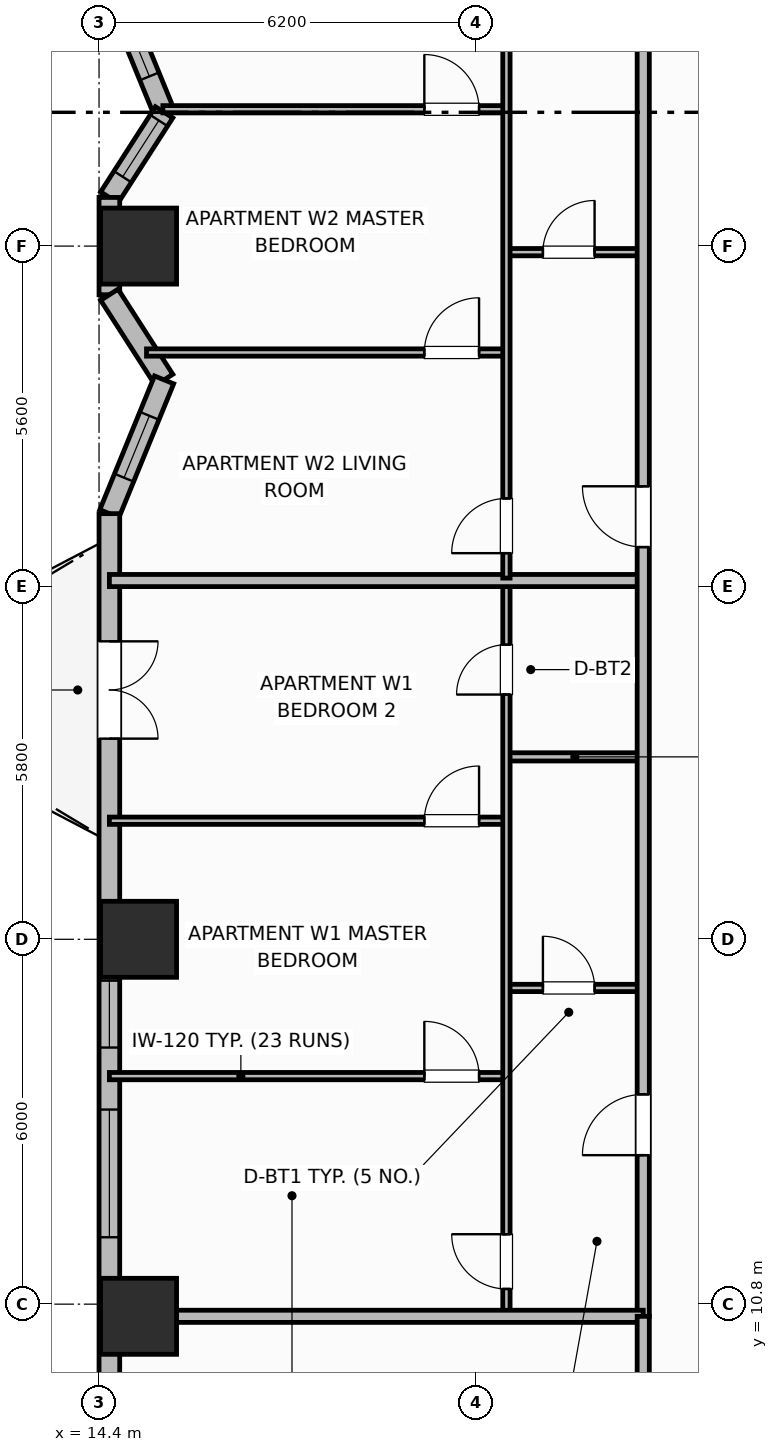
"""IFC4 building model, lengths in metres.
Left out: names, types, materials, properties, quantities, classifications, styles, units other than length and angle.
Written with IfcOpenShell. Run it as: python <this file> out.ifc"""

import sys

from ifc_helpers import new_model, si_unit, direction, frame, frame_2d, origin, origin_2d, place, context, subcontext, project, spatial, rectangle, extrude, element, fill, save


model = new_model("IFC4")
c1 = context("Model", 3, precision=1e-05, world=origin(), true_north=direction((0.0, 1.0)))
c2 = subcontext(c1, "Body", "Model", "MODEL_VIEW")
j1 = project(units=[si_unit("LENGTHUNIT", "METRE"), si_unit("PLANEANGLEUNIT", "RADIAN")], contexts=[c1])
p1 = place(None, origin())
s1 = spatial("IfcSite", under=j1, at=p1, CompositionType="ELEMENT")
p2 = place(p1, origin())
s2 = spatial("IfcBuilding", under=s1, at=p2, CompositionType="ELEMENT")
p3 = place(p2, frame((0.0, 0.0, 39.9)))
s3 = spatial("IfcBuildingStorey", under=s2, at=p3, CompositionType="ELEMENT", Elevation=39.9)
for number, where, z_axis, x_axis in (
    (1, (15.05, 10.6, 0.0), (0.0, 0.0, 1.0), (1.0, 0.0, 0.0)),
    (2, (15.05, 16.8, 0.0), (0.0, 0.0, 1.0), (1.0, 0.0, 0.0)),
    (3, (15.05, 28.2, 0.0), (0.0, 0.0, 1.0), (1.0, 0.0, 0.0)),
):
    element("IfcColumn", number, at=place(p3, frame(where, z_axis=z_axis, x_axis=x_axis)), inside=s3, PredefinedType="COLUMN", context=c2, shape_type="SweptSolid", body=[
        extrude(rectangle(XDim=1.25, YDim=1.25, at=origin_2d()), origin(), (0.0, 0.0, 1.0), 3.7),
    ])
p4 = place(p3, frame((14.57, 32.6, 0.0), z_axis=(0.0, 0.0, 1.0), x_axis=(0.378568858991, -0.925573130013, 0.0)))
e4 = element("IfcWall", 4, at=p4, inside=s3, PredefinedType="SOLIDWALL", context=c2, shape_type="SweptSolid", body=[
    extrude(rectangle(XDim=2.377, YDim=0.34, at=frame_2d((1.188, 0.0))), origin(), (0.0, 0.0, 1.0), 2.7),
])
p5 = place(p4, frame((0.638, 0.0, 0.89)))
e5 = element("IfcOpeningElement", 5, at=p5, cuts=e4, PredefinedType="OPENING", context=c2, shape_type="SweptSolid", body=[
    extrude(rectangle(XDim=1.1, YDim=1.65, at=frame_2d((0.55, 0.825))), frame((0.0, 0.18, 0.0), z_axis=(0.0, -1.0, 0.0), x_axis=(1.0, 0.0, 0.0)), (0.0, 0.0, 1.0), 0.36),
])
p6 = place(p3, frame((15.47, 30.4, 0.0), z_axis=(0.0, 0.0, 1.0), x_axis=(-0.540742762169, -0.841188008214, 0.0)))
e6 = element("IfcWall", 6, at=p6, inside=s3, PredefinedType="SOLIDWALL", context=c2, shape_type="SweptSolid", body=[
    extrude(rectangle(XDim=1.664, YDim=0.34, at=frame_2d((0.832, 0.0))), origin(), (0.0, 0.0, 1.0), 2.7),
])
p7 = place(p6, frame((0.16, 0.0, 0.89)))
e7 = element("IfcOpeningElement", 7, at=p7, cuts=e6, PredefinedType="OPENING", context=c2, shape_type="SweptSolid", body=[
    extrude(rectangle(XDim=1.1, YDim=1.65, at=frame_2d((0.55, 0.825))), frame((0.0, 0.18, 0.0), z_axis=(0.0, -1.0, 0.0), x_axis=(1.0, 0.0, 0.0)), (0.0, 0.0, 1.0), 0.36),
])
p8 = place(p3, frame((14.57, 29.0, 0.0), z_axis=(0.0, 0.0, 1.0), x_axis=(0.0, -1.0, 0.0)))
e8 = element("IfcWall", 8, at=p8, inside=s3, PredefinedType="SOLIDWALL", context=c2, shape_type="SweptSolid", body=[
    extrude(rectangle(XDim=1.6, YDim=0.34, at=frame_2d((0.8, 0.0))), origin(), (0.0, 0.0, 1.0), 2.7),
])
p9 = place(p3, frame((14.57, 27.4, 0.0), z_axis=(0.0, 0.0, 1.0), x_axis=(0.540742762169, -0.841188008214, 0.0)))
e9 = element("IfcWall", 9, at=p9, inside=s3, PredefinedType="SOLIDWALL", context=c2, shape_type="SweptSolid", body=[
    extrude(rectangle(XDim=1.664, YDim=0.34, at=frame_2d((0.832, 0.0))), origin(), (0.0, 0.0, 1.0), 2.7),
])
p10 = place(p3, frame((15.47, 26.0, 0.0), z_axis=(0.0, 0.0, 1.0), x_axis=(-0.378604849088, -0.925558408879, 0.0)))
e10 = element("IfcWall", 10, at=p10, inside=s3, PredefinedType="SOLIDWALL", context=c2, shape_type="SweptSolid", body=[
    extrude(rectangle(XDim=2.377, YDim=0.34, at=frame_2d((1.188, 0.0))), origin(), (0.0, 0.0, 1.0), 2.7),
])
p11 = place(p10, frame((0.638, 0.0, 0.89)))
e11 = element("IfcOpeningElement", 11, at=p11, cuts=e10, PredefinedType="OPENING", context=c2, shape_type="SweptSolid", body=[
    extrude(rectangle(XDim=1.1, YDim=1.65, at=frame_2d((0.55, 0.825))), frame((0.0, 0.18, 0.0), z_axis=(0.0, -1.0, 0.0), x_axis=(1.0, 0.0, 0.0)), (0.0, 0.0, 1.0), 0.36),
])
p12 = place(p3, frame((14.57, 23.8, 0.0), z_axis=(0.0, 0.0, 1.0), x_axis=(0.0, -1.0, 0.0)))
e12 = element("IfcWall", 12, at=p12, inside=s3, PredefinedType="SOLIDWALL", context=c2, shape_type="SweptSolid", body=[
    extrude(rectangle(XDim=14.8, YDim=0.34, at=frame_2d((7.4, 0.0))), origin(), (0.0, 0.0, 1.0), 2.7),
])
p13 = place(p12, frame((2.1, 0.0, 0.0)))
e13 = element("IfcOpeningElement", 13, at=p13, cuts=e12, PredefinedType="OPENING", context=c2, shape_type="SweptSolid", body=[
    extrude(rectangle(XDim=1.6, YDim=2.1, at=frame_2d((0.8, 1.05))), frame((0.0, 0.18, 0.0), z_axis=(0.0, -1.0, 0.0), x_axis=(1.0, 0.0, 0.0)), (0.0, 0.0, 1.0), 0.36),
])
p14 = place(p12, frame((7.68, 0.0, 0.89)))
e14 = element("IfcOpeningElement", 14, at=p14, cuts=e12, PredefinedType="OPENING", context=c2, shape_type="SweptSolid", body=[
    extrude(rectangle(XDim=1.1, YDim=1.65, at=frame_2d((0.55, 0.825))), frame((0.0, 0.18, 0.0), z_axis=(0.0, -1.0, 0.0), x_axis=(1.0, 0.0, 0.0)), (0.0, 0.0, 1.0), 0.36),
])
p15 = place(p12, frame((9.8, 0.0, 0.68)))
e15 = element("IfcOpeningElement", 15, at=p15, cuts=e12, PredefinedType="OPENING", context=c2, shape_type="SweptSolid", body=[
    extrude(rectangle(XDim=2.1, YDim=1.9, at=frame_2d((1.05, 0.95))), frame((0.0, 0.18, 0.0), z_axis=(0.0, -1.0, 0.0), x_axis=(1.0, 0.0, 0.0)), (0.0, 0.0, 1.0), 0.36),
])
p16 = place(p3, frame((21.1, 16.0, 0.0), z_axis=(0.0, 0.0, 1.0), x_axis=(1.0, 0.0, 0.0)))
e16 = element("IfcWall", 16, at=p16, inside=s3, PredefinedType="PARTITIONING", context=c2, shape_type="SweptSolid", body=[
    extrude(rectangle(XDim=2.25, YDim=0.12, at=frame_2d((1.125, 0.0))), origin(), (0.0, 0.0, 1.0), 2.53),
])
p17 = place(p16, frame((0.6, 0.0, 0.0)))
e17 = element("IfcOpeningElement", 17, at=p17, cuts=e16, PredefinedType="OPENING", context=c2, shape_type="SweptSolid", body=[
    extrude(rectangle(XDim=0.85, YDim=2.1, at=frame_2d((0.425, 1.05))), frame((0.0, 0.07, 0.0), z_axis=(0.0, -1.0, 0.0), x_axis=(1.0, 0.0, 0.0)), (0.0, 0.0, 1.0), 0.14),
])
p18 = place(p3, frame((21.1, 19.8, 0.0), z_axis=(0.0, 0.0, 1.0), x_axis=(1.0, 0.0, 0.0)))
e18 = element("IfcWall", 18, at=p18, inside=s3, PredefinedType="PARTITIONING", context=c2, shape_type="SweptSolid", body=[
    extrude(rectangle(XDim=2.25, YDim=0.135, at=frame_2d((1.125, 0.0))), origin(), (0.0, 0.0, 1.0), 2.53),
])
p19 = place(p3, frame((14.57, 14.55, 0.0), z_axis=(0.0, 0.0, 1.0), x_axis=(1.0, 0.0, 0.0)))
e19 = element("IfcWall", 19, at=p19, inside=s3, PredefinedType="PARTITIONING", context=c2, shape_type="SweptSolid", body=[
    extrude(rectangle(XDim=6.53, YDim=0.12, at=frame_2d((3.265, 0.0))), origin(), (0.0, 0.0, 1.0), 2.53),
])
p20 = place(p19, frame((5.18, 0.0, 0.0)))
e20 = element("IfcOpeningElement", 20, at=p20, cuts=e19, PredefinedType="OPENING", context=c2, shape_type="SweptSolid", body=[
    extrude(rectangle(XDim=0.9, YDim=2.1, at=frame_2d((0.45, 1.05))), frame((0.0, 0.07, 0.0), z_axis=(0.0, -1.0, 0.0), x_axis=(1.0, 0.0, 0.0)), (0.0, 0.0, 1.0), 0.14),
])
p21 = place(p3, frame((14.57, 18.75, 0.0), z_axis=(0.0, 0.0, 1.0), x_axis=(1.0, 0.0, 0.0)))
e21 = element("IfcWall", 21, at=p21, inside=s3, PredefinedType="PARTITIONING", context=c2, shape_type="SweptSolid", body=[
    extrude(rectangle(XDim=6.53, YDim=0.12, at=frame_2d((3.265, 0.0))), origin(), (0.0, 0.0, 1.0), 2.53),
])
p22 = place(p21, frame((5.18, 0.0, 0.0)))
e22 = element("IfcOpeningElement", 22, at=p22, cuts=e21, PredefinedType="OPENING", context=c2, shape_type="SweptSolid", body=[
    extrude(rectangle(XDim=0.9, YDim=2.1, at=frame_2d((0.45, 1.05))), frame((0.0, 0.07, 0.0), z_axis=(0.0, -1.0, 0.0), x_axis=(1.0, 0.0, 0.0)), (0.0, 0.0, 1.0), 0.14),
])
p23 = place(p3, frame((21.1, 10.64, 0.0), z_axis=(0.0, 0.0, 1.0), x_axis=(0.0, 1.0, 0.0)))
e23 = element("IfcWall", 23, at=p23, inside=s3, PredefinedType="PARTITIONING", context=c2, shape_type="SweptSolid", body=[
    extrude(rectangle(XDim=12.02, YDim=0.12, at=frame_2d((6.01, 0.0))), origin(), (0.0, 0.0, 1.0), 2.53),
])
p24 = place(p23, frame((0.41, 0.0, 0.0)))
e24 = element("IfcOpeningElement", 24, at=p24, cuts=e23, PredefinedType="OPENING", context=c2, shape_type="SweptSolid", body=[
    extrude(rectangle(XDim=0.9, YDim=2.1, at=frame_2d((0.45, 1.05))), frame((0.0, 0.07, 0.0), z_axis=(0.0, -1.0, 0.0), x_axis=(1.0, 0.0, 0.0)), (0.0, 0.0, 1.0), 0.14),
])
p25 = place(p23, frame((10.185, 0.0, 0.0)))
e25 = element("IfcOpeningElement", 25, at=p25, cuts=e23, PredefinedType="OPENING", context=c2, shape_type="SweptSolid", body=[
    extrude(rectangle(XDim=0.82, YDim=2.08, at=frame_2d((0.41, 1.04))), frame((0.0, 0.07, 0.0), z_axis=(0.0, -1.0, 0.0), x_axis=(1.0, 0.0, 0.0)), (0.0, 0.0, 1.0), 0.14),
])
p26 = place(p3, frame((14.57, 22.7, 0.0), z_axis=(0.0, 0.0, 1.0), x_axis=(1.0, 0.0, 0.0)))
e26 = element("IfcWall", 26, at=p26, inside=s3, PredefinedType="PARTITIONING", context=c2, shape_type="SweptSolid", body=[
    extrude(rectangle(XDim=8.78, YDim=0.2, at=frame_2d((4.39, 0.0))), origin(), (0.0, 0.0, 1.0), 2.53),
])
p27 = place(p3, frame((21.1, 28.1, 0.0), z_axis=(0.0, 0.0, 1.0), x_axis=(1.0, 0.0, 0.0)))
e27 = element("IfcWall", 27, at=p27, inside=s3, PredefinedType="PARTITIONING", context=c2, shape_type="SweptSolid", body=[
    extrude(rectangle(XDim=2.25, YDim=0.12, at=frame_2d((1.125, 0.0))), origin(), (0.0, 0.0, 1.0), 2.53),
])
p28 = place(p27, frame((0.6, 0.0, 0.0)))
e28 = element("IfcOpeningElement", 28, at=p28, cuts=e27, PredefinedType="OPENING", context=c2, shape_type="SweptSolid", body=[
    extrude(rectangle(XDim=0.85, YDim=2.1, at=frame_2d((0.425, 1.05))), frame((0.0, 0.07, 0.0), z_axis=(0.0, -1.0, 0.0), x_axis=(1.0, 0.0, 0.0)), (0.0, 0.0, 1.0), 0.14),
])
p29 = place(p3, frame((15.181, 26.45, 0.0), z_axis=(0.0, 0.0, 1.0), x_axis=(1.0, 0.0, 0.0)))
e29 = element("IfcWall", 29, at=p29, inside=s3, PredefinedType="PARTITIONING", context=c2, shape_type="SweptSolid", body=[
    extrude(rectangle(XDim=5.919, YDim=0.12, at=frame_2d((2.96, 0.0))), origin(), (0.0, 0.0, 1.0), 2.53),
])
p30 = place(p29, frame((4.569, 0.0, 0.0)))
e30 = element("IfcOpeningElement", 30, at=p30, cuts=e29, PredefinedType="OPENING", context=c2, shape_type="SweptSolid", body=[
    extrude(rectangle(XDim=0.9, YDim=2.1, at=frame_2d((0.45, 1.05))), frame((0.0, 0.07, 0.0), z_axis=(0.0, -1.0, 0.0), x_axis=(1.0, 0.0, 0.0)), (0.0, 0.0, 1.0), 0.14),
])
p31 = place(p3, frame((15.449, 30.45, 0.0), z_axis=(0.0, 0.0, 1.0), x_axis=(1.0, 0.0, 0.0)))
e31 = element("IfcWall", 31, at=p31, inside=s3, PredefinedType="PARTITIONING", context=c2, shape_type="SweptSolid", body=[
    extrude(rectangle(XDim=5.651, YDim=0.12, at=frame_2d((2.825, 0.0))), origin(), (0.0, 0.0, 1.0), 2.53),
])
p32 = place(p31, frame((4.301, 0.0, 0.0)))
e32 = element("IfcOpeningElement", 32, at=p32, cuts=e31, PredefinedType="OPENING", context=c2, shape_type="SweptSolid", body=[
    extrude(rectangle(XDim=0.9, YDim=2.1, at=frame_2d((0.45, 1.05))), frame((0.0, 0.07, 0.0), z_axis=(0.0, -1.0, 0.0), x_axis=(1.0, 0.0, 0.0)), (0.0, 0.0, 1.0), 0.14),
])
p33 = place(p3, frame((21.1, 22.74, 0.0), z_axis=(0.0, 0.0, 1.0), x_axis=(0.0, 1.0, 0.0)))
e33 = element("IfcWall", 33, at=p33, inside=s3, PredefinedType="PARTITIONING", context=c2, shape_type="SweptSolid", body=[
    extrude(rectangle(XDim=11.404, YDim=0.12, at=frame_2d((5.702, 0.0))), origin(), (0.0, 0.0, 1.0), 2.53),
])
p34 = place(p33, frame((0.41, 0.0, 0.0)))
e34 = element("IfcOpeningElement", 34, at=p34, cuts=e33, PredefinedType="OPENING", context=c2, shape_type="SweptSolid", body=[
    extrude(rectangle(XDim=0.9, YDim=2.1, at=frame_2d((0.45, 1.05))), frame((0.0, 0.07, 0.0), z_axis=(0.0, -1.0, 0.0), x_axis=(1.0, 0.0, 0.0)), (0.0, 0.0, 1.0), 0.14),
])
p35 = place(p3, frame((23.35, 10.6, 0.0), z_axis=(0.0, 0.0, 1.0), x_axis=(0.0, 1.0, 0.0)))
e35 = element("IfcWall", 35, at=p35, inside=s3, PredefinedType="PARTITIONING", context=c2, shape_type="SweptSolid", body=[
    extrude(rectangle(XDim=35.2, YDim=0.2, at=frame_2d((17.6, 0.0))), origin(), (0.0, 0.0, 1.0), 2.53),
])
p36 = place(p35, frame((2.65, 0.0, 0.0)))
e36 = element("IfcOpeningElement", 36, at=p36, cuts=e35, PredefinedType="OPENING", context=c2, shape_type="SweptSolid", body=[
    extrude(rectangle(XDim=1.0, YDim=2.15, at=frame_2d((0.5, 1.075))), frame((0.0, 0.11, 0.0), z_axis=(0.0, -1.0, 0.0), x_axis=(1.0, 0.0, 0.0)), (0.0, 0.0, 1.0), 0.22),
])
p37 = place(p35, frame((12.65, 0.0, 0.0)))
e37 = element("IfcOpeningElement", 37, at=p37, cuts=e35, PredefinedType="OPENING", context=c2, shape_type="SweptSolid", body=[
    extrude(rectangle(XDim=1.0, YDim=2.15, at=frame_2d((0.5, 1.075))), frame((0.0, 0.11, 0.0), z_axis=(0.0, -1.0, 0.0), x_axis=(1.0, 0.0, 0.0)), (0.0, 0.0, 1.0), 0.22),
])
p38 = place(p35, frame((24.134, 0.0, 0.0)))
e38 = element("IfcOpeningElement", 38, at=p38, cuts=e35, PredefinedType="OPENING", context=c2, shape_type="SweptSolid", body=[
    extrude(rectangle(XDim=1.0, YDim=2.15, at=frame_2d((0.5, 1.075))), frame((0.0, 0.11, 0.0), z_axis=(0.0, -1.0, 0.0), x_axis=(1.0, 0.0, 0.0)), (0.0, 0.0, 1.0), 0.22),
])
p39 = place(p3, frame((14.99, 10.6, 0.0), z_axis=(0.0, 0.0, 1.0), x_axis=(1.0, 0.0, 0.0)))
e39 = element("IfcWall", 39, at=p39, inside=s3, PredefinedType="PARTITIONING", context=c2, shape_type="SweptSolid", body=[
    extrude(rectangle(XDim=8.36, YDim=0.2, at=frame_2d((4.18, 0.0))), origin(), (0.0, 0.0, 1.0), 2.53),
])
p40 = place(p3, frame((23.35, 4.97, 0.0), z_axis=(0.0, 0.0, 1.0), x_axis=(0.0, 1.0, 0.0)))
e40 = element("IfcWall", 40, at=p40, inside=s3, PredefinedType="PARTITIONING", context=c2, shape_type="SweptSolid", body=[
    extrude(rectangle(XDim=5.63, YDim=0.2, at=frame_2d((2.815, 0.0))), origin(), (0.0, 0.0, 1.0), 2.53),
])
p41 = place(p5, origin())
e41 = element("IfcWindow", 41, at=p41, inside=s3, PartitioningType="SINGLE_PANEL", PredefinedType="WINDOW", context=c2, shape_type="SweptSolid", body=[
    extrude(rectangle(XDim=1.1, YDim=1.65, at=frame_2d((0.55, 0.825))), frame((0.0, 0.03, 0.0), z_axis=(0.0, -1.0, 0.0), x_axis=(1.0, 0.0, 0.0)), (0.0, 0.0, 1.0), 0.06),
])
fill(e5, e41)
p42 = place(p7, origin())
e42 = element("IfcWindow", 42, at=p42, inside=s3, PartitioningType="SINGLE_PANEL", PredefinedType="WINDOW", context=c2, shape_type="SweptSolid", body=[
    extrude(rectangle(XDim=1.1, YDim=1.65, at=frame_2d((0.55, 0.825))), frame((0.0, 0.03, 0.0), z_axis=(0.0, -1.0, 0.0), x_axis=(1.0, 0.0, 0.0)), (0.0, 0.0, 1.0), 0.06),
])
fill(e7, e42)
p43 = place(p11, origin())
e43 = element("IfcWindow", 43, at=p43, inside=s3, PartitioningType="SINGLE_PANEL", PredefinedType="WINDOW", context=c2, shape_type="SweptSolid", body=[
    extrude(rectangle(XDim=1.1, YDim=1.65, at=frame_2d((0.55, 0.825))), frame((0.0, 0.03, 0.0), z_axis=(0.0, -1.0, 0.0), x_axis=(1.0, 0.0, 0.0)), (0.0, 0.0, 1.0), 0.06),
])
fill(e11, e43)
p44 = place(p13, origin())
e44 = element("IfcDoor", 44, at=p44, inside=s3, OperationType="DOUBLE_DOOR_SINGLE_SWING", PredefinedType="DOOR", context=c2, shape_type="SweptSolid", body=[
    extrude(rectangle(XDim=1.6, YDim=2.1, at=frame_2d((0.8, 1.05))), frame((0.0, 0.025, 0.0), z_axis=(0.0, -1.0, 0.0), x_axis=(1.0, 0.0, 0.0)), (0.0, 0.0, 1.0), 0.05),
])
fill(e13, e44)
p45 = place(p14, origin())
e45 = element("IfcWindow", 45, at=p45, inside=s3, PartitioningType="SINGLE_PANEL", PredefinedType="WINDOW", context=c2, shape_type="SweptSolid", body=[
    extrude(rectangle(XDim=1.1, YDim=1.65, at=frame_2d((0.55, 0.825))), frame((0.0, 0.03, 0.0), z_axis=(0.0, -1.0, 0.0), x_axis=(1.0, 0.0, 0.0)), (0.0, 0.0, 1.0), 0.06),
])
fill(e14, e45)
p46 = place(p15, origin())
e46 = element("IfcWindow", 46, at=p46, inside=s3, PartitioningType="SINGLE_PANEL", PredefinedType="WINDOW", context=c2, shape_type="SweptSolid", body=[
    extrude(rectangle(XDim=2.1, YDim=1.9, at=frame_2d((1.05, 0.95))), frame((0.0, 0.03, 0.0), z_axis=(0.0, -1.0, 0.0), x_axis=(1.0, 0.0, 0.0)), (0.0, 0.0, 1.0), 0.06),
])
fill(e15, e46)
p47 = place(p17, origin())
e47 = element("IfcDoor", 47, at=p47, inside=s3, OperationType="SINGLE_SWING_LEFT", PredefinedType="DOOR", context=c2, shape_type="SweptSolid", body=[
    extrude(rectangle(XDim=0.85, YDim=2.1, at=frame_2d((0.425, 1.05))), frame((0.0, 0.025, 0.0), z_axis=(0.0, -1.0, 0.0), x_axis=(1.0, 0.0, 0.0)), (0.0, 0.0, 1.0), 0.05),
])
fill(e17, e47)
p48 = place(p20, origin())
e48 = element("IfcDoor", 48, at=p48, inside=s3, OperationType="SINGLE_SWING_LEFT", PredefinedType="DOOR", context=c2, shape_type="SweptSolid", body=[
    extrude(rectangle(XDim=0.9, YDim=2.1, at=frame_2d((0.45, 1.05))), frame((0.0, 0.025, 0.0), z_axis=(0.0, -1.0, 0.0), x_axis=(1.0, 0.0, 0.0)), (0.0, 0.0, 1.0), 0.05),
])
fill(e20, e48)
p49 = place(p22, origin())
e49 = element("IfcDoor", 49, at=p49, inside=s3, OperationType="SINGLE_SWING_RIGHT", PredefinedType="DOOR", context=c2, shape_type="SweptSolid", body=[
    extrude(rectangle(XDim=0.9, YDim=2.1, at=frame_2d((0.45, 1.05))), frame((0.0, 0.025, 0.0), z_axis=(0.0, -1.0, 0.0), x_axis=(1.0, 0.0, 0.0)), (0.0, 0.0, 1.0), 0.05),
])
fill(e22, e49)
p50 = place(p24, origin())
e50 = element("IfcDoor", 50, at=p50, inside=s3, OperationType="SINGLE_SWING_RIGHT", PredefinedType="DOOR", context=c2, shape_type="SweptSolid", body=[
    extrude(rectangle(XDim=0.9, YDim=2.1, at=frame_2d((0.45, 1.05))), frame((0.0, 0.025, 0.0), z_axis=(0.0, -1.0, 0.0), x_axis=(1.0, 0.0, 0.0)), (0.0, 0.0, 1.0), 0.05),
])
fill(e24, e50)
p51 = place(p25, origin())
e51 = element("IfcDoor", 51, at=p51, inside=s3, OperationType="SINGLE_SWING_LEFT", PredefinedType="DOOR", context=c2, shape_type="SweptSolid", body=[
    extrude(rectangle(XDim=0.82, YDim=2.08, at=frame_2d((0.41, 1.04))), frame((0.0, 0.025, 0.0), z_axis=(0.0, -1.0, 0.0), x_axis=(1.0, 0.0, 0.0)), (0.0, 0.0, 1.0), 0.05),
])
fill(e25, e51)
p52 = place(p28, origin())
e52 = element("IfcDoor", 52, at=p52, inside=s3, OperationType="SINGLE_SWING_RIGHT", PredefinedType="DOOR", context=c2, shape_type="SweptSolid", body=[
    extrude(rectangle(XDim=0.85, YDim=2.1, at=frame_2d((0.425, 1.05))), frame((0.0, 0.025, 0.0), z_axis=(0.0, -1.0, 0.0), x_axis=(1.0, 0.0, 0.0)), (0.0, 0.0, 1.0), 0.05),
])
fill(e28, e52)
p53 = place(p30, origin())
e53 = element("IfcDoor", 53, at=p53, inside=s3, OperationType="SINGLE_SWING_RIGHT", PredefinedType="DOOR", context=c2, shape_type="SweptSolid", body=[
    extrude(rectangle(XDim=0.9, YDim=2.1, at=frame_2d((0.45, 1.05))), frame((0.0, 0.025, 0.0), z_axis=(0.0, -1.0, 0.0), x_axis=(1.0, 0.0, 0.0)), (0.0, 0.0, 1.0), 0.05),
])
fill(e30, e53)
p54 = place(p32, origin())
e54 = element("IfcDoor", 54, at=p54, inside=s3, OperationType="SINGLE_SWING_LEFT", PredefinedType="DOOR", context=c2, shape_type="SweptSolid", body=[
    extrude(rectangle(XDim=0.9, YDim=2.1, at=frame_2d((0.45, 1.05))), frame((0.0, 0.025, 0.0), z_axis=(0.0, -1.0, 0.0), x_axis=(1.0, 0.0, 0.0)), (0.0, 0.0, 1.0), 0.05),
])
fill(e32, e54)
p55 = place(p34, origin())
e55 = element("IfcDoor", 55, at=p55, inside=s3, OperationType="SINGLE_SWING_LEFT", PredefinedType="DOOR", context=c2, shape_type="SweptSolid", body=[
    extrude(rectangle(XDim=0.9, YDim=2.1, at=frame_2d((0.45, 1.05))), frame((0.0, 0.025, 0.0), z_axis=(0.0, -1.0, 0.0), x_axis=(1.0, 0.0, 0.0)), (0.0, 0.0, 1.0), 0.05),
])
fill(e34, e55)
p56 = place(p36, origin())
e56 = element("IfcDoor", 56, at=p56, inside=s3, OperationType="SINGLE_SWING_LEFT", PredefinedType="DOOR", context=c2, shape_type="SweptSolid", body=[
    extrude(rectangle(XDim=1.0, YDim=2.15, at=frame_2d((0.5, 1.075))), frame((0.0, 0.025, 0.0), z_axis=(0.0, -1.0, 0.0), x_axis=(1.0, 0.0, 0.0)), (0.0, 0.0, 1.0), 0.05),
])
fill(e36, e56)
p57 = place(p37, origin())
e57 = element("IfcDoor", 57, at=p57, inside=s3, OperationType="SINGLE_SWING_RIGHT", PredefinedType="DOOR", context=c2, shape_type="SweptSolid", body=[
    extrude(rectangle(XDim=1.0, YDim=2.15, at=frame_2d((0.5, 1.075))), frame((0.0, 0.025, 0.0), z_axis=(0.0, -1.0, 0.0), x_axis=(1.0, 0.0, 0.0)), (0.0, 0.0, 1.0), 0.05),
])
fill(e37, e57)
save(model, sys.argv[1])
